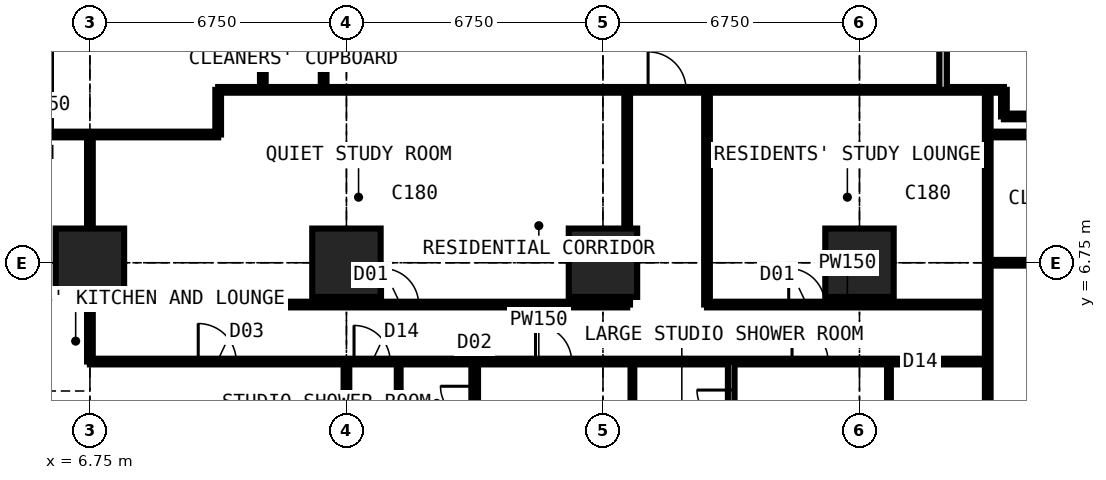
"""IFC4 building model, lengths in metres.
Left out: names, types, materials, properties, quantities, classifications, styles, units other than length and angle.
Written with IfcOpenShell. Run it as: python <this file> out.ifc"""

import sys

from ifc_helpers import new_model, si_unit, direction, frame, frame_2d, origin, origin_2d, place, context, subcontext, project, spatial, rectangle, extrude, element, fill, save


model = new_model("IFC4")
c1 = context("Model", 3, precision=1e-05, world=origin(), true_north=direction((0.0, 1.0)))
c2 = subcontext(c1, "Body", "Model", "MODEL_VIEW")
j1 = project(units=[si_unit("LENGTHUNIT", "METRE"), si_unit("PLANEANGLEUNIT", "RADIAN")], contexts=[c1])
p1 = place(None, origin())
s1 = spatial("IfcSite", under=j1, at=p1, CompositionType="ELEMENT")
p2 = place(p1, origin())
s2 = spatial("IfcBuilding", under=s1, at=p2, CompositionType="ELEMENT")
p3 = place(p2, frame((0.0, 0.0, 94.5)))
s3 = spatial("IfcBuildingStorey", under=s2, at=p3, CompositionType="ELEMENT", Elevation=94.5)
for number, where, z_axis, x_axis in (
    (1, (6.75, 6.75, 0.0), (0.0, 0.0, 1.0), (1.0, 0.0, 0.0)),
    (2, (13.5, 6.75, 0.0), (0.0, 0.0, 1.0), (1.0, 0.0, 0.0)),
    (3, (20.25, 6.75, 0.0), (0.0, 0.0, 1.0), (1.0, 0.0, 0.0)),
    (4, (27.0, 6.75, 0.0), (0.0, 0.0, 1.0), (1.0, 0.0, 0.0)),
):
    element("IfcColumn", number, at=place(p3, frame(where, z_axis=z_axis, x_axis=x_axis)), inside=s3, PredefinedType="COLUMN", context=c2, shape_type="SweptSolid", body=[
        extrude(rectangle(XDim=1.8, YDim=1.8, at=origin_2d()), origin(), (0.0, 0.0, 1.0), 3.6),
    ])
p4 = place(p3, frame((-0.734, 10.125, 0.0), z_axis=(0.0, 0.0, 1.0), x_axis=(1.0, 0.0, 0.0)))
e5 = element("IfcWall", 5, at=p4, inside=s3, PredefinedType="PARTITIONING", context=c2, shape_type="SweptSolid", body=[
    extrude(rectangle(XDim=10.859, YDim=0.15, at=frame_2d((5.429, 0.0))), origin(), (0.0, 0.0, 1.0), 3.375),
])
p5 = place(p3, frame((6.75, 4.15, 0.0), z_axis=(0.0, 0.0, 1.0), x_axis=(0.0, 1.0, 0.0)))
e6 = element("IfcWall", 6, at=p5, inside=s3, PredefinedType="PARTITIONING", context=c2, shape_type="SweptSolid", body=[
    extrude(rectangle(XDim=5.975, YDim=0.15, at=frame_2d((2.988, 0.0))), origin(), (0.0, 0.0, 1.0), 2.877),
])
p6 = place(p3, frame((6.75, 4.15, 0.0), z_axis=(0.0, 0.0, 1.0), x_axis=(1.0, 0.0, 0.0)))
e7 = element("IfcWall", 7, at=p6, inside=s3, PredefinedType="PARTITIONING", context=c2, shape_type="SweptSolid", body=[
    extrude(rectangle(XDim=23.625, YDim=0.15, at=frame_2d((11.812, 0.0))), origin(), (0.0, 0.0, 1.0), 3.375),
])
p7 = place(p6, frame((2.85, 0.0, 0.0)))
e8 = element("IfcOpeningElement", 8, at=p7, cuts=e7, PredefinedType="OPENING", context=c2, shape_type="SweptSolid", body=[
    extrude(rectangle(XDim=1.0, YDim=2.2, at=frame_2d((0.5, 1.1))), frame((0.0, 0.085, 0.0), z_axis=(0.0, -1.0, 0.0), x_axis=(1.0, 0.0, 0.0)), (0.0, 0.0, 1.0), 0.17),
])
p8 = place(p6, frame((18.475, 0.0, 0.0)))
e9 = element("IfcOpeningElement", 9, at=p8, cuts=e7, PredefinedType="OPENING", context=c2, shape_type="SweptSolid", body=[
    extrude(rectangle(XDim=0.95, YDim=2.2, at=frame_2d((0.475, 1.1))), frame((0.0, 0.085, 0.0), z_axis=(0.0, -1.0, 0.0), x_axis=(1.0, 0.0, 0.0)), (0.0, 0.0, 1.0), 0.17),
])
p9 = place(p6, frame((11.725, 0.0, 0.0)))
e10 = element("IfcOpeningElement", 10, at=p9, cuts=e7, PredefinedType="OPENING", context=c2, shape_type="SweptSolid", body=[
    extrude(rectangle(XDim=0.95, YDim=2.2, at=frame_2d((0.475, 1.1))), frame((0.0, 0.085, 0.0), z_axis=(0.0, -1.0, 0.0), x_axis=(1.0, 0.0, 0.0)), (0.0, 0.0, 1.0), 0.17),
])
p10 = place(p6, frame((6.95, 0.0, 0.0)))
e11 = element("IfcOpeningElement", 11, at=p10, cuts=e7, PredefinedType="OPENING", context=c2, shape_type="SweptSolid", body=[
    extrude(rectangle(XDim=0.95, YDim=2.2, at=frame_2d((0.475, 1.1))), frame((0.0, 0.085, 0.0), z_axis=(0.0, -1.0, 0.0), x_axis=(1.0, 0.0, 0.0)), (0.0, 0.0, 1.0), 0.17),
])
p11 = place(p3, frame((6.75, 5.65, 0.0), z_axis=(0.0, 0.0, 1.0), x_axis=(1.0, 0.0, 0.0)))
e12 = element("IfcWall", 12, at=p11, inside=s3, PredefinedType="PARTITIONING", context=c2, shape_type="SweptSolid", body=[
    extrude(rectangle(XDim=14.137, YDim=0.15, at=frame_2d((7.069, 0.0))), origin(), (0.0, 0.0, 1.0), 3.375),
])
p12 = place(p11, frame((7.7, 0.0, 0.0)))
e13 = element("IfcOpeningElement", 13, at=p12, cuts=e12, PredefinedType="OPENING", context=c2, shape_type="SweptSolid", body=[
    extrude(rectangle(XDim=0.95, YDim=2.2, at=frame_2d((0.475, 1.1))), frame((0.0, 0.085, 0.0), z_axis=(0.0, -1.0, 0.0), x_axis=(1.0, 0.0, 0.0)), (0.0, 0.0, 1.0), 0.17),
])
p13 = place(p3, frame((10.125, 10.125, 0.0), z_axis=(0.0, 0.0, 1.0), x_axis=(0.0, 1.0, 0.0)))
e14 = element("IfcWall", 14, at=p13, inside=s3, PredefinedType="PARTITIONING", context=c2, shape_type="SweptSolid", body=[
    extrude(rectangle(XDim=1.175, YDim=0.15, at=frame_2d((0.587, 0.0))), origin(), (0.0, 0.0, 1.0), 3.375),
])
p14 = place(p3, frame((10.125, 11.3, 0.0), z_axis=(0.0, 0.0, 1.0), x_axis=(1.0, 0.0, 0.0)))
e15 = element("IfcWall", 15, at=p14, inside=s3, PredefinedType="PARTITIONING", context=c2, shape_type="SweptSolid", body=[
    extrude(rectangle(XDim=20.675, YDim=0.15, at=frame_2d((10.337, 0.0))), origin(), (0.0, 0.0, 1.0), 3.375),
])
p15 = place(p14, frame((11.312, 0.0, 0.0)))
e16 = element("IfcOpeningElement", 16, at=p15, cuts=e15, PredefinedType="OPENING", context=c2, shape_type="SweptSolid", body=[
    extrude(rectangle(XDim=1.0, YDim=2.2, at=frame_2d((0.5, 1.1))), frame((0.0, 0.085, 0.0), z_axis=(0.0, -1.0, 0.0), x_axis=(1.0, 0.0, 0.0)), (0.0, 0.0, 1.0), 0.17),
])
p16 = place(p3, frame((11.3, 11.3, 0.0), z_axis=(0.0, 0.0, 1.0), x_axis=(0.0, 1.0, 0.0)))
e17 = element("IfcWall", 17, at=p16, inside=s3, PredefinedType="PARTITIONING", context=c2, shape_type="SweptSolid", body=[
    extrude(rectangle(XDim=19.3, YDim=0.15, at=frame_2d((9.65, 0.0))), origin(), (0.0, 0.0, 1.0), 3.375),
])
p17 = place(p16, frame((13.525, 0.0, 0.0)))
e18 = element("IfcOpeningElement", 18, at=p17, cuts=e17, PredefinedType="OPENING", context=c2, shape_type="SweptSolid", body=[
    extrude(rectangle(XDim=1.0, YDim=2.2, at=frame_2d((0.5, 1.1))), frame((0.0, 0.085, 0.0), z_axis=(0.0, -1.0, 0.0), x_axis=(1.0, 0.0, 0.0)), (0.0, 0.0, 1.0), 0.17),
])
p18 = place(p16, frame((10.438, 0.0, 0.0)))
e19 = element("IfcOpeningElement", 19, at=p18, cuts=e17, PredefinedType="OPENING", context=c2, shape_type="SweptSolid", body=[
    extrude(rectangle(XDim=1.0, YDim=2.2, at=frame_2d((0.5, 1.1))), frame((0.0, 0.085, 0.0), z_axis=(0.0, -1.0, 0.0), x_axis=(1.0, 0.0, 0.0)), (0.0, 0.0, 1.0), 0.17),
])
p19 = place(p3, frame((12.9, 11.3, 0.0), z_axis=(0.0, 0.0, 1.0), x_axis=(0.0, 1.0, 0.0)))
e20 = element("IfcWall", 20, at=p19, inside=s3, PredefinedType="PARTITIONING", context=c2, shape_type="SweptSolid", body=[
    extrude(rectangle(XDim=1.6, YDim=0.15, at=frame_2d((0.8, 0.0))), origin(), (0.0, 0.0, 1.0), 3.375),
])
p20 = place(p3, frame((13.5, -0.734, 0.0), z_axis=(0.0, 0.0, 1.0), x_axis=(0.0, 1.0, 0.0)))
e21 = element("IfcWall", 21, at=p20, inside=s3, PredefinedType="PARTITIONING", context=c2, shape_type="SweptSolid", body=[
    extrude(rectangle(XDim=4.884, YDim=0.15, at=frame_2d((2.442, 0.0))), origin(), (0.0, 0.0, 1.0), 2.877),
])
p21 = place(p3, frame((14.875, 1.95, 0.0), z_axis=(0.0, 0.0, 1.0), x_axis=(0.0, 1.0, 0.0)))
e22 = element("IfcWall", 22, at=p21, inside=s3, PredefinedType="PARTITIONING", context=c2, shape_type="SweptSolid", body=[
    extrude(rectangle(XDim=2.2, YDim=0.1, at=frame_2d((1.1, 0.0))), origin(), (0.0, 0.0, 1.0), 3.375),
])
p22 = place(p3, frame((16.875, -0.734, 0.0), z_axis=(0.0, 0.0, 1.0), x_axis=(0.0, 1.0, 0.0)))
e23 = element("IfcWall", 23, at=p22, inside=s3, PredefinedType="PARTITIONING", context=c2, shape_type="SweptSolid", body=[
    extrude(rectangle(XDim=4.884, YDim=0.175, at=frame_2d((2.442, 0.0))), origin(), (0.0, 0.0, 1.0), 3.375),
])
p23 = place(p22, frame((3.334, 0.0, 0.0)))
e24 = element("IfcOpeningElement", 24, at=p23, cuts=e23, PredefinedType="OPENING", context=c2, shape_type="SweptSolid", body=[
    extrude(rectangle(XDim=0.9, YDim=2.2, at=frame_2d((0.45, 1.1))), frame((0.0, 0.097, 0.0), z_axis=(0.0, -1.0, 0.0), x_axis=(1.0, 0.0, 0.0)), (0.0, 0.0, 1.0), 0.195),
])
p24 = place(p3, frame((20.887, 5.65, 0.0), z_axis=(0.0, 0.0, 1.0), x_axis=(0.0, 1.0, 0.0)))
e25 = element("IfcWall", 25, at=p24, inside=s3, PredefinedType="PARTITIONING", context=c2, shape_type="SweptSolid", body=[
    extrude(rectangle(XDim=5.65, YDim=0.15, at=frame_2d((2.825, 0.0))), origin(), (0.0, 0.0, 1.0), 3.375),
])
p25 = place(p3, frame((21.025, 1.75, 0.0), z_axis=(0.0, 0.0, 1.0), x_axis=(0.0, 1.0, 0.0)))
e26 = element("IfcWall", 26, at=p25, inside=s3, PredefinedType="PARTITIONING", context=c2, shape_type="SweptSolid", body=[
    extrude(rectangle(XDim=2.4, YDim=0.1, at=frame_2d((1.2, 0.0))), origin(), (0.0, 0.0, 1.0), 3.375),
])
p26 = place(p3, frame((22.988, 5.65, 0.0), z_axis=(0.0, 0.0, 1.0), x_axis=(1.0, 0.0, 0.0)))
e27 = element("IfcWall", 27, at=p26, inside=s3, PredefinedType="PARTITIONING", context=c2, shape_type="SweptSolid", body=[
    extrude(rectangle(XDim=7.387, YDim=0.15, at=frame_2d((3.694, 0.0))), origin(), (0.0, 0.0, 1.0), 3.375),
])
p27 = place(p26, frame((2.15, 0.0, 0.0)))
e28 = element("IfcOpeningElement", 28, at=p27, cuts=e27, PredefinedType="OPENING", context=c2, shape_type="SweptSolid", body=[
    extrude(rectangle(XDim=0.95, YDim=2.2, at=frame_2d((0.475, 1.1))), frame((0.0, 0.085, 0.0), z_axis=(0.0, -1.0, 0.0), x_axis=(1.0, 0.0, 0.0)), (0.0, 0.0, 1.0), 0.17),
])
p28 = place(p3, frame((22.988, 5.65, 0.0), z_axis=(0.0, 0.0, 1.0), x_axis=(0.0, 1.0, 0.0)))
e29 = element("IfcWall", 29, at=p28, inside=s3, PredefinedType="PARTITIONING", context=c2, shape_type="SweptSolid", body=[
    extrude(rectangle(XDim=5.65, YDim=0.15, at=frame_2d((2.825, 0.0))), origin(), (0.0, 0.0, 1.0), 3.375),
])
p29 = place(p3, frame((23.625, -0.734, 0.0), z_axis=(0.0, 0.0, 1.0), x_axis=(0.0, 1.0, 0.0)))
e30 = element("IfcWall", 30, at=p29, inside=s3, PredefinedType="PARTITIONING", context=c2, shape_type="SweptSolid", body=[
    extrude(rectangle(XDim=4.884, YDim=0.175, at=frame_2d((2.442, 0.0))), origin(), (0.0, 0.0, 1.0), 3.375),
])
p30 = place(p29, frame((3.234, 0.0, 0.0)))
e31 = element("IfcOpeningElement", 31, at=p30, cuts=e30, PredefinedType="OPENING", context=c2, shape_type="SweptSolid", body=[
    extrude(rectangle(XDim=0.9, YDim=2.2, at=frame_2d((0.45, 1.1))), frame((0.0, 0.097, 0.0), z_axis=(0.0, -1.0, 0.0), x_axis=(1.0, 0.0, 0.0)), (0.0, 0.0, 1.0), 0.195),
])
p31 = place(p3, frame((27.775, 1.75, 0.0), z_axis=(0.0, 0.0, 1.0), x_axis=(0.0, 1.0, 0.0)))
e32 = element("IfcWall", 32, at=p31, inside=s3, PredefinedType="PARTITIONING", context=c2, shape_type="SweptSolid", body=[
    extrude(rectangle(XDim=2.4, YDim=0.1, at=frame_2d((1.2, 0.0))), origin(), (0.0, 0.0, 1.0), 3.375),
])
p32 = place(p3, frame((29.2, 11.3, 0.0), z_axis=(0.0, 0.0, 1.0), x_axis=(0.0, 1.0, 0.0)))
e33 = element("IfcWall", 33, at=p32, inside=s3, PredefinedType="PARTITIONING", context=c2, shape_type="SweptSolid", body=[
    extrude(rectangle(XDim=17.9, YDim=0.2, at=frame_2d((8.95, 0.0))), origin(), (0.0, 0.0, 1.0), 3.375),
])
p33 = place(p32, frame((8.35, 0.0, 0.0)))
e34 = element("IfcOpeningElement", 34, at=p33, cuts=e33, PredefinedType="OPENING", context=c2, shape_type="SweptSolid", body=[
    extrude(rectangle(XDim=1.2, YDim=2.2, at=frame_2d((0.6, 1.1))), frame((0.0, 0.11, 0.0), z_axis=(0.0, -1.0, 0.0), x_axis=(1.0, 0.0, 0.0)), (0.0, 0.0, 1.0), 0.22),
])
p34 = place(p3, frame((30.375, -0.734, 0.0), z_axis=(0.0, 0.0, 1.0), x_axis=(0.0, 1.0, 0.0)))
e35 = element("IfcWall", 35, at=p34, inside=s3, PredefinedType="PARTITIONING", context=c2, shape_type="SweptSolid", body=[
    extrude(rectangle(XDim=12.034, YDim=0.15, at=frame_2d((6.017, 0.0))), origin(), (0.0, 0.0, 1.0), 3.375),
])
p35 = place(p3, frame((30.375, 6.75, 0.0), z_axis=(0.0, 0.0, 1.0), x_axis=(1.0, 0.0, 0.0)))
e36 = element("IfcWall", 36, at=p35, inside=s3, PredefinedType="PARTITIONING", context=c2, shape_type="SweptSolid", body=[
    extrude(rectangle(XDim=10.859, YDim=0.15, at=frame_2d((5.429, 0.0))), origin(), (0.0, 0.0, 1.0), 2.877),
])
p36 = place(p35, frame((1.45, 0.0, 0.0)))
e37 = element("IfcOpeningElement", 37, at=p36, cuts=e36, PredefinedType="OPENING", context=c2, shape_type="SweptSolid", body=[
    extrude(rectangle(XDim=1.0, YDim=2.2, at=frame_2d((0.5, 1.1))), frame((0.0, 0.085, 0.0), z_axis=(0.0, -1.0, 0.0), x_axis=(1.0, 0.0, 0.0)), (0.0, 0.0, 1.0), 0.17),
])
p37 = place(p3, frame((30.375, 10.125, 0.0), z_axis=(0.0, 0.0, 1.0), x_axis=(1.0, 0.0, 0.0)))
e38 = element("IfcWall", 38, at=p37, inside=s3, PredefinedType="PARTITIONING", context=c2, shape_type="SweptSolid", body=[
    extrude(rectangle(XDim=10.859, YDim=0.15, at=frame_2d((5.429, 0.0))), origin(), (0.0, 0.0, 1.0), 3.375),
])
p38 = place(p37, frame((2.5, 0.0, 0.0)))
e39 = element("IfcOpeningElement", 39, at=p38, cuts=e38, PredefinedType="OPENING", context=c2, shape_type="SweptSolid", body=[
    extrude(rectangle(XDim=1.0, YDim=2.2, at=frame_2d((0.5, 1.1))), frame((0.0, 0.085, 0.0), z_axis=(0.0, -1.0, 0.0), x_axis=(1.0, 0.0, 0.0)), (0.0, 0.0, 1.0), 0.17),
])
p39 = place(p3, frame((30.8, 10.6, 0.0), z_axis=(0.0, 0.0, 1.0), x_axis=(0.0, 1.0, 0.0)))
e40 = element("IfcWall", 40, at=p39, inside=s3, PredefinedType="PARTITIONING", context=c2, shape_type="SweptSolid", body=[
    extrude(rectangle(XDim=0.7, YDim=0.15, at=frame_2d((0.35, 0.0))), origin(), (0.0, 0.0, 1.0), 3.375),
])
p40 = place(p3, frame((30.8, 10.6, 0.0), z_axis=(0.0, 0.0, 1.0), x_axis=(1.0, 0.0, 0.0)))
e41 = element("IfcWall", 41, at=p40, inside=s3, PredefinedType="PARTITIONING", context=c2, shape_type="SweptSolid", body=[
    extrude(rectangle(XDim=1.85, YDim=0.15, at=frame_2d((0.925, 0.0))), origin(), (0.0, 0.0, 1.0), 3.375),
])
p41 = place(p7, origin())
e42 = element("IfcDoor", 42, at=p41, inside=s3, OperationType="SINGLE_SWING_LEFT", PredefinedType="DOOR", context=c2, shape_type="SweptSolid", body=[
    extrude(rectangle(XDim=1.0, YDim=2.2, at=frame_2d((0.5, 1.1))), frame((0.0, 0.025, 0.0), z_axis=(0.0, -1.0, 0.0), x_axis=(1.0, 0.0, 0.0)), (0.0, 0.0, 1.0), 0.05),
])
fill(e8, e42)
p42 = place(p8, origin())
e43 = element("IfcDoor", 43, at=p42, inside=s3, OperationType="SINGLE_SWING_LEFT", PredefinedType="DOOR", context=c2, shape_type="SweptSolid", body=[
    extrude(rectangle(XDim=0.95, YDim=2.2, at=frame_2d((0.475, 1.1))), frame((0.0, 0.025, 0.0), z_axis=(0.0, -1.0, 0.0), x_axis=(1.0, 0.0, 0.0)), (0.0, 0.0, 1.0), 0.05),
])
fill(e9, e43)
p43 = place(p9, origin())
e44 = element("IfcDoor", 44, at=p43, inside=s3, OperationType="SINGLE_SWING_LEFT", PredefinedType="DOOR", context=c2, shape_type="SweptSolid", body=[
    extrude(rectangle(XDim=0.95, YDim=2.2, at=frame_2d((0.475, 1.1))), frame((0.0, 0.025, 0.0), z_axis=(0.0, -1.0, 0.0), x_axis=(1.0, 0.0, 0.0)), (0.0, 0.0, 1.0), 0.05),
])
fill(e10, e44)
p44 = place(p30, origin())
e45 = element("IfcDoor", 45, at=p44, inside=s3, OperationType="SINGLE_SWING_RIGHT", PredefinedType="DOOR", context=c2, shape_type="SweptSolid", body=[
    extrude(rectangle(XDim=0.9, YDim=2.2, at=frame_2d((0.45, 1.1))), frame((0.0, 0.025, 0.0), z_axis=(0.0, -1.0, 0.0), x_axis=(1.0, 0.0, 0.0)), (0.0, 0.0, 1.0), 0.05),
])
fill(e31, e45)
p45 = place(p10, origin())
e46 = element("IfcDoor", 46, at=p45, inside=s3, OperationType="SINGLE_SWING_LEFT", PredefinedType="DOOR", context=c2, shape_type="SweptSolid", body=[
    extrude(rectangle(XDim=0.95, YDim=2.2, at=frame_2d((0.475, 1.1))), frame((0.0, 0.025, 0.0), z_axis=(0.0, -1.0, 0.0), x_axis=(1.0, 0.0, 0.0)), (0.0, 0.0, 1.0), 0.05),
])
fill(e11, e46)
p46 = place(p23, origin())
e47 = element("IfcDoor", 47, at=p46, inside=s3, OperationType="SINGLE_SWING_RIGHT", PredefinedType="DOOR", context=c2, shape_type="SweptSolid", body=[
    extrude(rectangle(XDim=0.9, YDim=2.2, at=frame_2d((0.45, 1.1))), frame((0.0, 0.025, 0.0), z_axis=(0.0, -1.0, 0.0), x_axis=(1.0, 0.0, 0.0)), (0.0, 0.0, 1.0), 0.05),
])
fill(e24, e47)
p47 = place(p15, origin())
e48 = element("IfcDoor", 48, at=p47, inside=s3, OperationType="SINGLE_SWING_LEFT", PredefinedType="DOOR", context=c2, shape_type="SweptSolid", body=[
    extrude(rectangle(XDim=1.0, YDim=2.2, at=frame_2d((0.5, 1.1))), frame((0.0, 0.025, 0.0), z_axis=(0.0, -1.0, 0.0), x_axis=(1.0, 0.0, 0.0)), (0.0, 0.0, 1.0), 0.05),
])
fill(e16, e48)
p48 = place(p27, origin())
e49 = element("IfcDoor", 49, at=p48, inside=s3, OperationType="SINGLE_SWING_LEFT", PredefinedType="DOOR", context=c2, shape_type="SweptSolid", body=[
    extrude(rectangle(XDim=0.95, YDim=2.2, at=frame_2d((0.475, 1.1))), frame((0.0, 0.025, 0.0), z_axis=(0.0, -1.0, 0.0), x_axis=(1.0, 0.0, 0.0)), (0.0, 0.0, 1.0), 0.05),
])
fill(e28, e49)
p49 = place(p12, origin())
e50 = element("IfcDoor", 50, at=p49, inside=s3, OperationType="SINGLE_SWING_LEFT", PredefinedType="DOOR", context=c2, shape_type="SweptSolid", body=[
    extrude(rectangle(XDim=0.95, YDim=2.2, at=frame_2d((0.475, 1.1))), frame((0.0, 0.025, 0.0), z_axis=(0.0, -1.0, 0.0), x_axis=(1.0, 0.0, 0.0)), (0.0, 0.0, 1.0), 0.05),
])
fill(e13, e50)
save(model, sys.argv[1])
